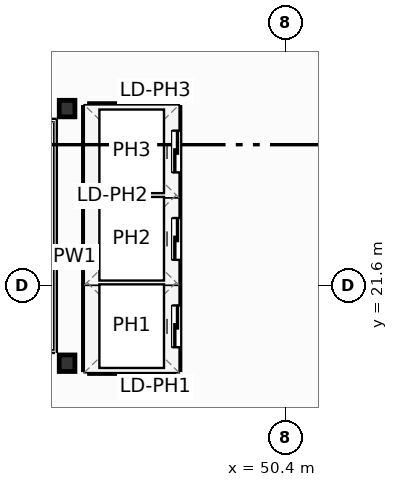
"""IFC4 building model, lengths in metres.
Left out: names, types, materials, properties, quantities, classifications, styles, units other than length and angle.
Written with IfcOpenShell. Run it as: python <this file> out.ifc"""

import sys

from ifc_helpers import new_model, si_unit, direction, frame, frame_2d, origin, origin_2d, place, context, subcontext, project, spatial, rectangle, i_section, extrude, element, fill, save


model = new_model("IFC4")
c1 = context("Model", 3, precision=1e-05, world=origin(), true_north=direction((0.0, 1.0)))
c2 = subcontext(c1, "Body", "Model", "MODEL_VIEW")
j1 = project(units=[si_unit("LENGTHUNIT", "METRE"), si_unit("PLANEANGLEUNIT", "RADIAN")], contexts=[c1])
p1 = place(None, origin())
s1 = spatial("IfcSite", under=j1, at=p1, CompositionType="ELEMENT")
p2 = place(p1, origin())
s2 = spatial("IfcBuilding", under=s1, at=p2, CompositionType="ELEMENT")
p3 = place(p2, frame((0.0, 0.0, 249.7)))
s3 = spatial("IfcBuildingStorey", under=s2, at=p3, CompositionType="ELEMENT", Elevation=249.7)
for number, where, z_axis, x_axis in (
    (1, (44.65, 19.55, 0.0), (0.0, 0.0, 1.0), (1.0, 0.0, 0.0)),
    (2, (44.65, 26.25, 0.0), (0.0, 0.0, 1.0), (1.0, 0.0, 0.0)),
):
    element("IfcColumn", number, at=place(p3, frame(where, z_axis=z_axis, x_axis=x_axis)), inside=s3, PredefinedType="COLUMN", context=c2, shape_type="SweptSolid", body=[
        extrude(i_section(OverallWidth=0.412, OverallDepth=0.435, WebThickness=0.036, FlangeThickness=0.057, FilletRadius=0.025, at=origin_2d()), origin(), (0.0, 0.0, 1.0), 3.7),
    ])
for number, where, z_axis, x_axis in (
    (3, (45.24, 21.675, 0.0), (0.0, 0.0, 1.0), (1.0, 0.0, 0.0)),
    (4, (45.24, 23.975, 0.0), (0.0, 0.0, 1.0), (1.0, 0.0, 0.0)),
):
    element("IfcWall", number, at=place(p3, frame(where, z_axis=z_axis, x_axis=x_axis)), inside=s3, PredefinedType="PARTITIONING", context=c2, shape_type="SweptSolid", body=[
        extrude(rectangle(XDim=2.22, YDim=0.2, at=frame_2d((1.11, 0.0))), origin(), (0.0, 0.0, 1.0), 3.38),
    ])
p4 = place(p3, frame((45.24, 19.38, 0.0), z_axis=(0.0, 0.0, 1.0), x_axis=(1.0, 0.0, 0.0)))
e5 = element("IfcWall", 5, at=p4, inside=s3, PredefinedType="PARTITIONING", context=c2, shape_type="SweptSolid", body=[
    extrude(rectangle(XDim=2.22, YDim=0.2, at=frame_2d((1.11, 0.0))), origin(), (0.0, 0.0, 1.0), 2.592),
])
p5 = place(p3, frame((45.24, 26.28, 0.0), z_axis=(0.0, 0.0, 1.0), x_axis=(1.0, 0.0, 0.0)))
e6 = element("IfcWall", 6, at=p5, inside=s3, PredefinedType="PARTITIONING", context=c2, shape_type="SweptSolid", body=[
    extrude(rectangle(XDim=2.22, YDim=0.2, at=frame_2d((1.11, 0.0))), origin(), (0.0, 0.0, 1.0), 3.38),
])
p6 = place(p3, frame((45.18, 19.38, 0.0), z_axis=(0.0, 0.0, 1.0), x_axis=(0.0, 1.0, 0.0)))
e7 = element("IfcWall", 7, at=p6, inside=s3, PredefinedType="PARTITIONING", context=c2, shape_type="SweptSolid", body=[
    extrude(rectangle(XDim=6.9, YDim=0.2, at=frame_2d((3.45, 0.0))), origin(), (0.0, 0.0, 1.0), 3.38),
])
p7 = place(p3, frame((47.52, 19.38, 0.0), z_axis=(0.0, 0.0, 1.0), x_axis=(0.0, 1.0, 0.0)))
e8 = element("IfcWall", 8, at=p7, inside=s3, PredefinedType="PARTITIONING", context=c2, shape_type="SweptSolid", body=[
    extrude(rectangle(XDim=6.9, YDim=0.2, at=frame_2d((3.45, 0.0))), origin(), (0.0, 0.0, 1.0), 3.38),
])
p8 = place(p7, frame((0.59, 0.0, 0.0)))
e9 = element("IfcOpeningElement", 9, at=p8, cuts=e8, PredefinedType="OPENING", context=c2, shape_type="SweptSolid", body=[
    extrude(rectangle(XDim=1.1, YDim=2.15, at=frame_2d((0.55, 1.075))), frame((0.0, 0.11, 0.0), z_axis=(0.0, -1.0, 0.0), x_axis=(1.0, 0.0, 0.0)), (0.0, 0.0, 1.0), 0.22),
])
p9 = place(p7, frame((2.89, 0.0, 0.0)))
e10 = element("IfcOpeningElement", 10, at=p9, cuts=e8, PredefinedType="OPENING", context=c2, shape_type="SweptSolid", body=[
    extrude(rectangle(XDim=1.1, YDim=2.15, at=frame_2d((0.55, 1.075))), frame((0.0, 0.11, 0.0), z_axis=(0.0, -1.0, 0.0), x_axis=(1.0, 0.0, 0.0)), (0.0, 0.0, 1.0), 0.22),
])
p10 = place(p7, frame((5.19, 0.0, 0.0)))
e11 = element("IfcOpeningElement", 11, at=p10, cuts=e8, PredefinedType="OPENING", context=c2, shape_type="SweptSolid", body=[
    extrude(rectangle(XDim=1.1, YDim=2.15, at=frame_2d((0.55, 1.075))), frame((0.0, 0.11, 0.0), z_axis=(0.0, -1.0, 0.0), x_axis=(1.0, 0.0, 0.0)), (0.0, 0.0, 1.0), 0.22),
])
p11 = place(p8, origin())
e12 = element("IfcDoor", 12, at=p11, inside=s3, OperationType="SLIDING_TO_LEFT", PredefinedType="DOOR", context=c2, shape_type="SweptSolid", body=[
    extrude(rectangle(XDim=1.1, YDim=2.15, at=frame_2d((0.55, 1.075))), frame((0.0, 0.025, 0.0), z_axis=(0.0, -1.0, 0.0), x_axis=(1.0, 0.0, 0.0)), (0.0, 0.0, 1.0), 0.05),
])
fill(e9, e12)
p12 = place(p9, origin())
e13 = element("IfcDoor", 13, at=p12, inside=s3, OperationType="SLIDING_TO_LEFT", PredefinedType="DOOR", context=c2, shape_type="SweptSolid", body=[
    extrude(rectangle(XDim=1.1, YDim=2.15, at=frame_2d((0.55, 1.075))), frame((0.0, 0.025, 0.0), z_axis=(0.0, -1.0, 0.0), x_axis=(1.0, 0.0, 0.0)), (0.0, 0.0, 1.0), 0.05),
])
fill(e10, e13)
p13 = place(p10, origin())
e14 = element("IfcDoor", 14, at=p13, inside=s3, OperationType="SLIDING_TO_LEFT", PredefinedType="DOOR", context=c2, shape_type="SweptSolid", body=[
    extrude(rectangle(XDim=1.1, YDim=2.15, at=frame_2d((0.55, 1.075))), frame((0.0, 0.025, 0.0), z_axis=(0.0, -1.0, 0.0), x_axis=(1.0, 0.0, 0.0)), (0.0, 0.0, 1.0), 0.05),
])
fill(e11, e14)
save(model, sys.argv[1])
